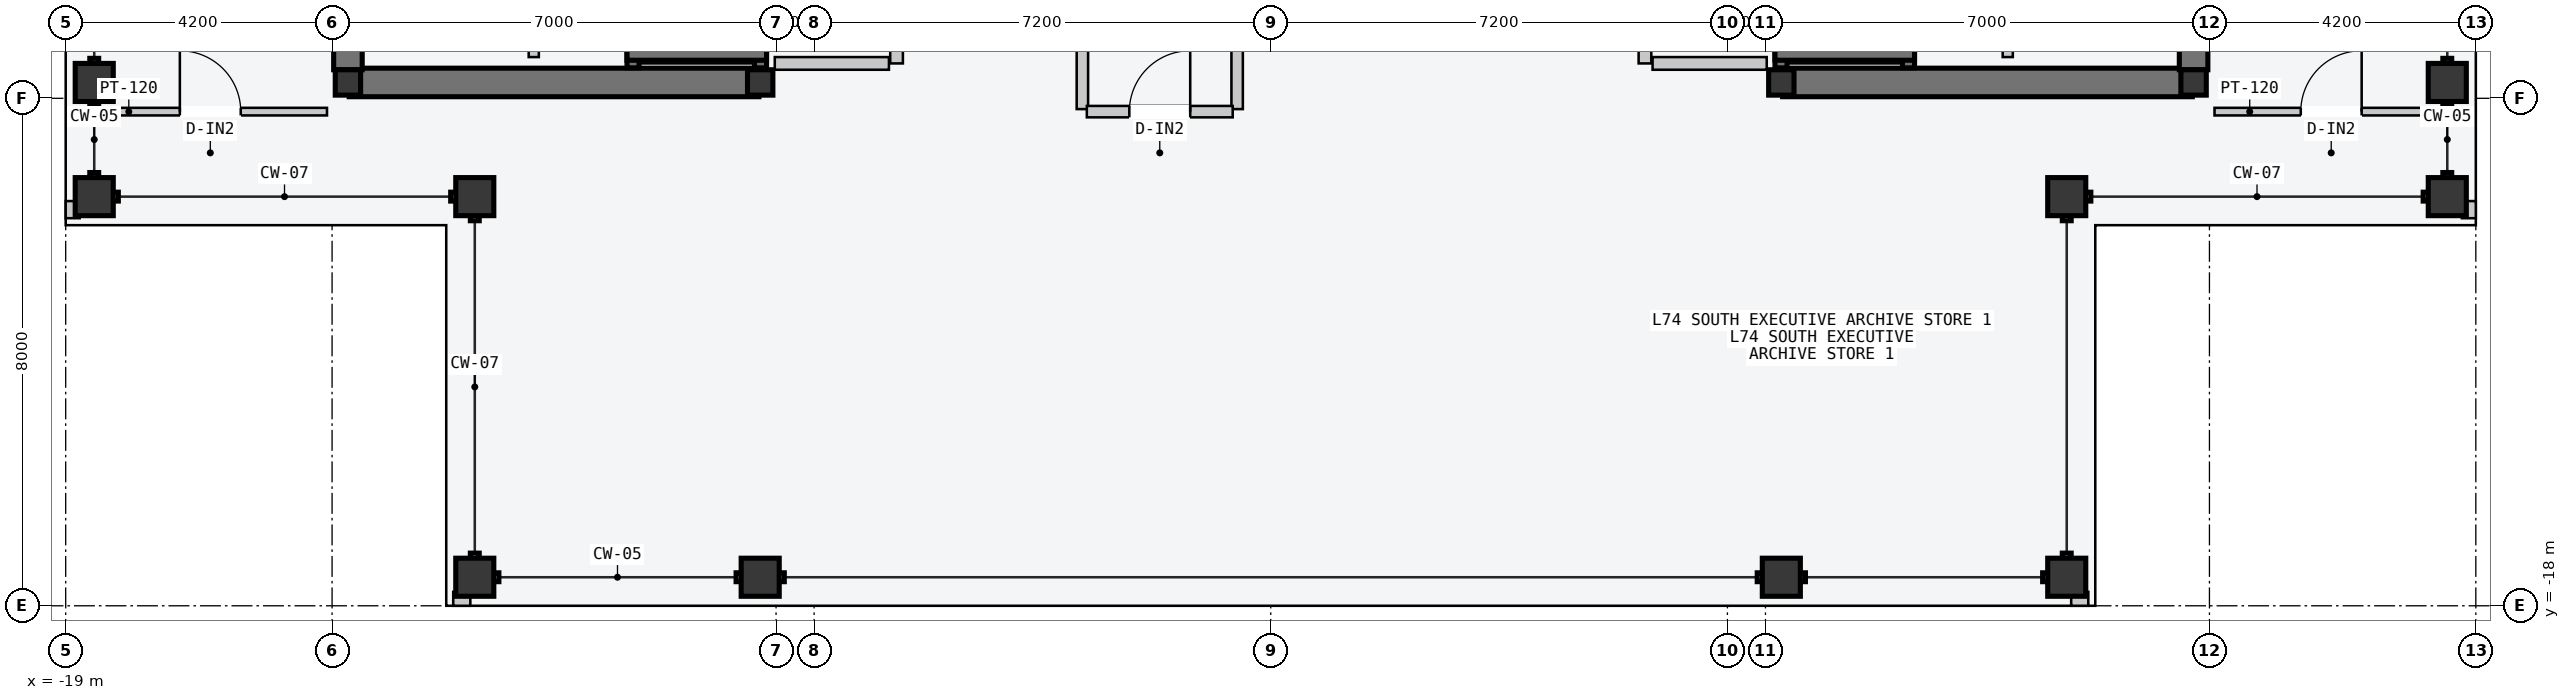
"""IFC4 building model, lengths in metres.
Left out: names, types, materials, properties, quantities, classifications, styles, units other than length and angle.
Written with IfcOpenShell. Run it as: python <this file> out.ifc"""

import sys

from ifc_helpers import new_model, si_unit, direction, frame, frame_2d, origin, origin_2d, place, context, subcontext, project, spatial, rectangle, hollow_rectangle, i_section, extrude, element, fill, save


model = new_model("IFC4")
c1 = context("Model", 3, precision=1e-05, world=origin(), true_north=direction((0.0, 1.0)))
c2 = subcontext(c1, "Body", "Model", "MODEL_VIEW")
j1 = project(units=[si_unit("LENGTHUNIT", "METRE"), si_unit("PLANEANGLEUNIT", "RADIAN")], contexts=[c1])
p1 = place(None, origin())
s1 = spatial("IfcSite", under=j1, at=p1, CompositionType="ELEMENT")
p2 = place(p1, origin())
s2 = spatial("IfcBuilding", under=s1, at=p2, CompositionType="ELEMENT")
p3 = place(p2, frame((0.0, 0.0, 280.8)))
s3 = spatial("IfcBuildingStorey", under=s2, at=p3, CompositionType="ELEMENT", Elevation=280.8)
p4 = place(p3, frame((-14.53, -9.75, -0.2), z_axis=(0.0, 0.0, 1.0), x_axis=(1.0, 0.0, 0.0)))
e1 = element("IfcWall", 1, at=p4, inside=s3, PredefinedType="SHEAR", context=c2, shape_type="SweptSolid", body=[
    extrude(rectangle(XDim=6.46, YDim=0.45, at=frame_2d((3.23, 0.0))), origin(), (0.0, 0.0, 1.0), 3.6),
])
p5 = place(p3, frame((-14.55, -9.55, -0.2), z_axis=(0.0, 0.0, 1.0), x_axis=(0.0, 1.0, 0.0)))
e2 = element("IfcWall", 2, at=p5, inside=s3, PredefinedType="SHEAR", context=c2, shape_type="SweptSolid", body=[
    extrude(rectangle(XDim=9.35, YDim=0.45, at=frame_2d((4.675, 0.0))), origin(), (0.0, 0.0, 1.0), 3.6),
])
p6 = place(p3, frame((8.07, -9.75, -0.2), z_axis=(0.0, 0.0, 1.0), x_axis=(1.0, 0.0, 0.0)))
e3 = element("IfcWall", 3, at=p6, inside=s3, PredefinedType="SHEAR", context=c2, shape_type="SweptSolid", body=[
    extrude(rectangle(XDim=6.46, YDim=0.45, at=frame_2d((3.23, 0.0))), origin(), (0.0, 0.0, 1.0), 3.6),
])
p7 = place(p3, frame((14.55, -9.55, -0.2), z_axis=(0.0, 0.0, 1.0), x_axis=(0.0, 1.0, 0.0)))
e4 = element("IfcWall", 4, at=p7, inside=s3, PredefinedType="SHEAR", context=c2, shape_type="SweptSolid", body=[
    extrude(rectangle(XDim=9.35, YDim=0.45, at=frame_2d((4.675, 0.0))), origin(), (0.0, 0.0, 1.0), 3.6),
])
for number, where, z_axis, x_axis in (
    (5, (-14.55, -9.75, 0.0), (0.0, 0.0, 1.0), (1.0, 0.0, 0.0)),
    (6, (-8.05, -9.75, 0.0), (0.0, 0.0, 1.0), (1.0, 0.0, 0.0)),
    (7, (8.05, -9.75, 0.0), (0.0, 0.0, 1.0), (1.0, 0.0, 0.0)),
    (8, (14.55, -9.75, 0.0), (0.0, 0.0, 1.0), (1.0, 0.0, 0.0)),
):
    element("IfcColumn", number, at=place(p3, frame(where, z_axis=z_axis, x_axis=x_axis)), inside=s3, PredefinedType="COLUMN", context=c2, shape_type="SweptSolid", body=[
        extrude(i_section(OverallWidth=0.4, OverallDepth=0.4, WebThickness=0.013, FlangeThickness=0.021, at=origin_2d()), origin(), (0.0, 0.0, 1.0), 3.6),
    ])
for number, where, z_axis, x_axis in (
    (9, (-12.55, -17.55, 0.0), (0.0, 0.0, 1.0), (1.0, 0.0, 0.0)),
    (10, (-8.05, -17.55, 0.0), (0.0, 0.0, 1.0), (1.0, 0.0, 0.0)),
    (11, (8.05, -17.55, 0.0), (0.0, 0.0, 1.0), (1.0, 0.0, 0.0)),
    (12, (12.55, -17.55, 0.0), (0.0, 0.0, 1.0), (1.0, 0.0, 0.0)),
    (13, (-18.55, -11.55, 0.0), (0.0, 0.0, 1.0), (0.0, 1.0, 0.0)),
    (14, (-18.55, -9.75, 0.0), (0.0, 0.0, 1.0), (0.0, 1.0, 0.0)),
    (15, (18.55, -11.55, 0.0), (0.0, 0.0, 1.0), (0.0, 1.0, 0.0)),
    (16, (18.55, -9.75, 0.0), (0.0, 0.0, 1.0), (0.0, 1.0, 0.0)),
    (17, (12.55, -11.55, 0.0), (0.0, 0.0, 1.0), (1.0, 0.0, 0.0)),
    (18, (-12.55, -11.55, 0.0), (0.0, 0.0, 1.0), (1.0, 0.0, 0.0)),
):
    element("IfcColumn", number, at=place(p3, frame(where, z_axis=z_axis, x_axis=x_axis)), inside=s3, PredefinedType="COLUMN", context=c2, shape_type="SweptSolid", body=[
        extrude(hollow_rectangle(XDim=0.6, YDim=0.6, WallThickness=0.025, at=origin_2d()), origin(), (0.0, 0.0, 1.0), 3.6),
    ])
for number, where, z_axis, x_axis in (
    (19, (-12.89, -17.89, 0.0), (0.0, 0.0, 1.0), (1.0, 0.0, 0.0)),
    (20, (-18.89, -11.89, 0.0), (0.0, 0.0, 1.0), (0.0, 1.0, 0.0)),
    (21, (12.62, -17.89, 0.0), (0.0, 0.0, 1.0), (1.0, 0.0, 0.0)),
    (22, (18.89, -11.89, 0.0), (0.0, 0.0, 1.0), (0.0, 1.0, 0.0)),
):
    element("IfcWall", number, at=place(p3, frame(where, z_axis=z_axis, x_axis=x_axis)), inside=s3, PredefinedType="PARAPET", context=c2, shape_type="SweptSolid", body=[
        extrude(rectangle(XDim=0.27, YDim=0.22, at=frame_2d((0.135, 0.0))), origin(), (0.0, 0.0, 1.0), 1.2),
    ])
p8 = place(p3, frame((-8.045, -9.52, -0.2), z_axis=(0.0, 0.0, 1.0), x_axis=(0.0, 1.0, 0.0)))
e23 = element("IfcWall", 23, at=p8, inside=s3, PredefinedType="SOLIDWALL", context=c2, shape_type="SweptSolid", body=[
    extrude(rectangle(XDim=2.12, YDim=0.19, at=frame_2d((1.06, 0.0))), origin(), (0.0, 0.0, 1.0), 3.6),
])
p9 = place(p8, frame((0.57, 0.0, 0.2)))
e24 = element("IfcOpeningElement", 24, at=p9, cuts=e23, PredefinedType="OPENING", context=c2, shape_type="SweptSolid", body=[
    extrude(rectangle(XDim=1.1, YDim=2.2, at=frame_2d((0.55, 1.1))), frame((0.0, 0.105, 0.0), z_axis=(0.0, -1.0, 0.0), x_axis=(1.0, 0.0, 0.0)), (0.0, 0.0, 1.0), 0.21),
])
p10 = place(p3, frame((-10.055, -9.52, -0.2), z_axis=(0.0, 0.0, 1.0), x_axis=(0.0, 1.0, 0.0)))
e25 = element("IfcWall", 25, at=p10, inside=s3, PredefinedType="SOLIDWALL", context=c2, shape_type="SweptSolid", body=[
    extrude(rectangle(XDim=2.12, YDim=0.19, at=frame_2d((1.06, 0.0))), origin(), (0.0, 0.0, 1.0), 3.6),
])
p11 = place(p3, frame((-10.15, -9.305, -0.2), z_axis=(0.0, 0.0, 1.0), x_axis=(1.0, 0.0, 0.0)))
e26 = element("IfcWall", 26, at=p11, inside=s3, PredefinedType="SOLIDWALL", context=c2, shape_type="SweptSolid", body=[
    extrude(rectangle(XDim=2.2, YDim=0.19, at=frame_2d((1.1, 0.0))), origin(), (0.0, 0.0, 1.0), 3.6),
])
p12 = place(p3, frame((8.045, -9.52, -0.2), z_axis=(0.0, 0.0, 1.0), x_axis=(0.0, 1.0, 0.0)))
e27 = element("IfcWall", 27, at=p12, inside=s3, PredefinedType="SOLIDWALL", context=c2, shape_type="SweptSolid", body=[
    extrude(rectangle(XDim=2.12, YDim=0.19, at=frame_2d((1.06, 0.0))), origin(), (0.0, 0.0, 1.0), 3.6),
])
p13 = place(p12, frame((0.57, 0.0, 0.2)))
e28 = element("IfcOpeningElement", 28, at=p13, cuts=e27, PredefinedType="OPENING", context=c2, shape_type="SweptSolid", body=[
    extrude(rectangle(XDim=1.1, YDim=2.2, at=frame_2d((0.55, 1.1))), frame((0.0, 0.105, 0.0), z_axis=(0.0, -1.0, 0.0), x_axis=(1.0, 0.0, 0.0)), (0.0, 0.0, 1.0), 0.21),
])
p14 = place(p3, frame((10.055, -9.52, -0.2), z_axis=(0.0, 0.0, 1.0), x_axis=(0.0, 1.0, 0.0)))
e29 = element("IfcWall", 29, at=p14, inside=s3, PredefinedType="SOLIDWALL", context=c2, shape_type="SweptSolid", body=[
    extrude(rectangle(XDim=2.12, YDim=0.19, at=frame_2d((1.06, 0.0))), origin(), (0.0, 0.0, 1.0), 3.6),
])
p15 = place(p3, frame((7.95, -9.305, -0.2), z_axis=(0.0, 0.0, 1.0), x_axis=(1.0, 0.0, 0.0)))
e30 = element("IfcWall", 30, at=p15, inside=s3, PredefinedType="SOLIDWALL", context=c2, shape_type="SweptSolid", body=[
    extrude(rectangle(XDim=2.2, YDim=0.19, at=frame_2d((1.1, 0.0))), origin(), (0.0, 0.0, 1.0), 3.6),
])
p16 = place(p3, frame((-5.9, -9.45, 0.0), z_axis=(0.0, 0.0, 1.0), x_axis=(0.0, 1.0, 0.0)))
e31 = element("IfcWall", 31, at=p16, inside=s3, PredefinedType="PARTITIONING", context=c2, shape_type="SweptSolid", body=[
    extrude(rectangle(XDim=10.5, YDim=0.2, at=frame_2d((5.25, 0.0))), origin(), (0.0, 0.0, 1.0), 3.4),
])
p17 = place(p16, frame((3.9, 0.0, 0.0)))
e32 = element("IfcOpeningElement", 32, at=p17, cuts=e31, PredefinedType="OPENING", context=c2, shape_type="SweptSolid", body=[
    extrude(rectangle(XDim=1.5, YDim=2.2, at=frame_2d((0.75, 1.1))), frame((0.0, 0.11, 0.0), z_axis=(0.0, -1.0, 0.0), x_axis=(1.0, 0.0, 0.0)), (0.0, 0.0, 1.0), 0.22),
])
p18 = place(p3, frame((-6.02, -9.45, 0.0), z_axis=(0.0, 0.0, 1.0), x_axis=(-1.0, 0.0, 0.0)))
e33 = element("IfcWall", 33, at=p18, inside=s3, PredefinedType="PARTITIONING", context=c2, shape_type="SweptSolid", body=[
    extrude(rectangle(XDim=1.8, YDim=0.2, at=frame_2d((0.9, 0.0))), origin(), (0.0, 0.0, 1.0), 3.4),
])
p19 = place(p3, frame((-11.62, -9.35, 0.0), z_axis=(0.0, 0.0, 1.0), x_axis=(0.0, 1.0, 0.0)))
e34 = element("IfcWall", 34, at=p19, inside=s3, PredefinedType="PARTITIONING", context=c2, shape_type="SweptSolid", body=[
    extrude(rectangle(XDim=3.85, YDim=0.16, at=frame_2d((1.925, 0.0))), origin(), (0.0, 0.0, 1.0), 3.4),
])
p20 = place(p19, frame((1.475, 0.0, 0.0)))
e35 = element("IfcOpeningElement", 35, at=p20, cuts=e34, PredefinedType="OPENING", context=c2, shape_type="SweptSolid", body=[
    extrude(rectangle(XDim=0.9, YDim=2.15, at=frame_2d((0.45, 1.075))), frame((0.0, 0.09, 0.0), z_axis=(0.0, -1.0, 0.0), x_axis=(1.0, 0.0, 0.0)), (0.0, 0.0, 1.0), 0.18),
])
p21 = place(p3, frame((5.9, -9.45, 0.0), z_axis=(0.0, 0.0, 1.0), x_axis=(0.0, 1.0, 0.0)))
e36 = element("IfcWall", 36, at=p21, inside=s3, PredefinedType="PARTITIONING", context=c2, shape_type="SweptSolid", body=[
    extrude(rectangle(XDim=10.5, YDim=0.2, at=frame_2d((5.25, 0.0))), origin(), (0.0, 0.0, 1.0), 3.4),
])
p22 = place(p21, frame((3.9, 0.0, 0.0)))
e37 = element("IfcOpeningElement", 37, at=p22, cuts=e36, PredefinedType="OPENING", context=c2, shape_type="SweptSolid", body=[
    extrude(rectangle(XDim=1.5, YDim=2.2, at=frame_2d((0.75, 1.1))), frame((0.0, 0.11, 0.0), z_axis=(0.0, -1.0, 0.0), x_axis=(1.0, 0.0, 0.0)), (0.0, 0.0, 1.0), 0.22),
])
p23 = place(p3, frame((6.02, -9.45, 0.0), z_axis=(0.0, 0.0, 1.0), x_axis=(1.0, 0.0, 0.0)))
e38 = element("IfcWall", 38, at=p23, inside=s3, PredefinedType="PARTITIONING", context=c2, shape_type="SweptSolid", body=[
    extrude(rectangle(XDim=1.8, YDim=0.2, at=frame_2d((0.9, 0.0))), origin(), (0.0, 0.0, 1.0), 3.4),
])
p24 = place(p3, frame((11.62, -9.35, 0.0), z_axis=(0.0, 0.0, 1.0), x_axis=(0.0, 1.0, 0.0)))
e39 = element("IfcWall", 39, at=p24, inside=s3, PredefinedType="PARTITIONING", context=c2, shape_type="SweptSolid", body=[
    extrude(rectangle(XDim=3.85, YDim=0.16, at=frame_2d((1.925, 0.0))), origin(), (0.0, 0.0, 1.0), 3.4),
])
p25 = place(p24, frame((0.3, 0.0, 0.0)))
e40 = element("IfcOpeningElement", 40, at=p25, cuts=e39, PredefinedType="OPENING", context=c2, shape_type="SweptSolid", body=[
    extrude(rectangle(XDim=0.85, YDim=2.12, at=frame_2d((0.425, 1.06))), frame((0.0, 0.09, 0.0), z_axis=(0.0, -1.0, 0.0), x_axis=(1.0, 0.0, 0.0)), (0.0, 0.0, 1.0), 0.18),
])
p26 = place(p24, frame((1.5, 0.0, 0.0)))
e41 = element("IfcOpeningElement", 41, at=p26, cuts=e39, PredefinedType="OPENING", context=c2, shape_type="SweptSolid", body=[
    extrude(rectangle(XDim=0.85, YDim=2.12, at=frame_2d((0.425, 1.06))), frame((0.0, 0.09, 0.0), z_axis=(0.0, -1.0, 0.0), x_axis=(1.0, 0.0, 0.0)), (0.0, 0.0, 1.0), 0.18),
])
p27 = place(p24, frame((2.7, 0.0, 0.0)))
e42 = element("IfcOpeningElement", 42, at=p27, cuts=e39, PredefinedType="OPENING", context=c2, shape_type="SweptSolid", body=[
    extrude(rectangle(XDim=0.85, YDim=2.12, at=frame_2d((0.425, 1.06))), frame((0.0, 0.09, 0.0), z_axis=(0.0, -1.0, 0.0), x_axis=(1.0, 0.0, 0.0)), (0.0, 0.0, 1.0), 0.18),
])
p28 = place(p3, frame((-2.97, -10.17, 0.0), z_axis=(0.0, 0.0, 1.0), x_axis=(0.0, 1.0, 0.0)))
e43 = element("IfcWall", 43, at=p28, inside=s3, PredefinedType="PARTITIONING", context=c2, shape_type="SweptSolid", body=[
    extrude(rectangle(XDim=4.49, YDim=0.18, at=frame_2d((2.245, 0.0))), origin(), (0.0, 0.0, 1.0), 3.4),
])
p29 = place(p28, frame((1.15, 0.0, 0.0)))
e44 = element("IfcOpeningElement", 44, at=p29, cuts=e43, PredefinedType="OPENING", context=c2, shape_type="SweptSolid", body=[
    extrude(rectangle(XDim=0.96, YDim=2.18, at=frame_2d((0.48, 1.09))), frame((0.0, 0.1, 0.0), z_axis=(0.0, -1.0, 0.0), x_axis=(1.0, 0.0, 0.0)), (0.0, 0.0, 1.0), 0.2),
])
p30 = place(p3, frame((-0.53, -10.17, 0.0), z_axis=(0.0, 0.0, 1.0), x_axis=(0.0, 1.0, 0.0)))
e45 = element("IfcWall", 45, at=p30, inside=s3, PredefinedType="PARTITIONING", context=c2, shape_type="SweptSolid", body=[
    extrude(rectangle(XDim=4.49, YDim=0.18, at=frame_2d((2.245, 0.0))), origin(), (0.0, 0.0, 1.0), 3.4),
])
p31 = place(p30, frame((1.15, 0.0, 0.0)))
e46 = element("IfcOpeningElement", 46, at=p31, cuts=e45, PredefinedType="OPENING", context=c2, shape_type="SweptSolid", body=[
    extrude(rectangle(XDim=0.96, YDim=2.18, at=frame_2d((0.48, 1.09))), frame((0.0, 0.1, 0.0), z_axis=(0.0, -1.0, 0.0), x_axis=(1.0, 0.0, 0.0)), (0.0, 0.0, 1.0), 0.2),
])
p32 = place(p3, frame((-2.9, -10.21, 0.0), z_axis=(0.0, 0.0, 1.0), x_axis=(1.0, 0.0, 0.0)))
e47 = element("IfcWall", 47, at=p32, inside=s3, PredefinedType="PARTITIONING", context=c2, shape_type="SweptSolid", body=[
    extrude(rectangle(XDim=2.3, YDim=0.18, at=frame_2d((1.15, 0.0))), origin(), (0.0, 0.0, 1.0), 3.4),
])
p33 = place(p32, frame((0.67, 0.0, 0.0)))
e48 = element("IfcOpeningElement", 48, at=p33, cuts=e47, PredefinedType="OPENING", context=c2, shape_type="SweptSolid", body=[
    extrude(rectangle(XDim=0.96, YDim=2.18, at=frame_2d((0.48, 1.09))), frame((0.0, 0.1, 0.0), z_axis=(0.0, -1.0, 0.0), x_axis=(1.0, 0.0, 0.0)), (0.0, 0.0, 1.0), 0.2),
])
p34 = place(p3, frame((-18.56, -10.21, 0.0), z_axis=(0.0, 0.0, 1.0), x_axis=(1.0, 0.0, 0.0)))
e49 = element("IfcWall", 49, at=p34, inside=s3, PredefinedType="PARTITIONING", context=c2, shape_type="SweptSolid", body=[
    extrude(rectangle(XDim=3.68, YDim=0.12, at=frame_2d((1.84, 0.0))), origin(), (0.0, 0.0, 1.0), 3.4),
])
p35 = place(p34, frame((1.36, 0.0, 0.0)))
e50 = element("IfcOpeningElement", 50, at=p35, cuts=e49, PredefinedType="OPENING", context=c2, shape_type="SweptSolid", body=[
    extrude(rectangle(XDim=0.96, YDim=2.18, at=frame_2d((0.48, 1.09))), frame((0.0, 0.07, 0.0), z_axis=(0.0, -1.0, 0.0), x_axis=(1.0, 0.0, 0.0)), (0.0, 0.0, 1.0), 0.14),
])
p36 = place(p3, frame((14.88, -10.21, 0.0), z_axis=(0.0, 0.0, 1.0), x_axis=(1.0, 0.0, 0.0)))
e51 = element("IfcWall", 51, at=p36, inside=s3, PredefinedType="PARTITIONING", context=c2, shape_type="SweptSolid", body=[
    extrude(rectangle(XDim=3.68, YDim=0.12, at=frame_2d((1.84, 0.0))), origin(), (0.0, 0.0, 1.0), 3.4),
])
p37 = place(p36, frame((1.36, 0.0, 0.0)))
e52 = element("IfcOpeningElement", 52, at=p37, cuts=e51, PredefinedType="OPENING", context=c2, shape_type="SweptSolid", body=[
    extrude(rectangle(XDim=0.96, YDim=2.18, at=frame_2d((0.48, 1.09))), frame((0.0, 0.07, 0.0), z_axis=(0.0, -1.0, 0.0), x_axis=(1.0, 0.0, 0.0)), (0.0, 0.0, 1.0), 0.14),
])
p38 = place(p33, origin())
e53 = element("IfcDoor", 53, at=p38, inside=s3, OperationType="SINGLE_SWING_RIGHT", PredefinedType="DOOR", context=c2, shape_type="SweptSolid", body=[
    extrude(rectangle(XDim=0.96, YDim=2.18, at=frame_2d((0.48, 1.09))), frame((0.0, 0.025, 0.0), z_axis=(0.0, -1.0, 0.0), x_axis=(1.0, 0.0, 0.0)), (0.0, 0.0, 1.0), 0.05),
])
fill(e48, e53)
p39 = place(p35, origin())
e54 = element("IfcDoor", 54, at=p39, inside=s3, OperationType="SINGLE_SWING_LEFT", PredefinedType="DOOR", context=c2, shape_type="SweptSolid", body=[
    extrude(rectangle(XDim=0.96, YDim=2.18, at=frame_2d((0.48, 1.09))), frame((0.0, 0.025, 0.0), z_axis=(0.0, -1.0, 0.0), x_axis=(1.0, 0.0, 0.0)), (0.0, 0.0, 1.0), 0.05),
])
fill(e50, e54)
p40 = place(p37, origin())
e55 = element("IfcDoor", 55, at=p40, inside=s3, OperationType="SINGLE_SWING_RIGHT", PredefinedType="DOOR", context=c2, shape_type="SweptSolid", body=[
    extrude(rectangle(XDim=0.96, YDim=2.18, at=frame_2d((0.48, 1.09))), frame((0.0, 0.025, 0.0), z_axis=(0.0, -1.0, 0.0), x_axis=(1.0, 0.0, 0.0)), (0.0, 0.0, 1.0), 0.05),
])
fill(e52, e55)
save(model, sys.argv[1])
